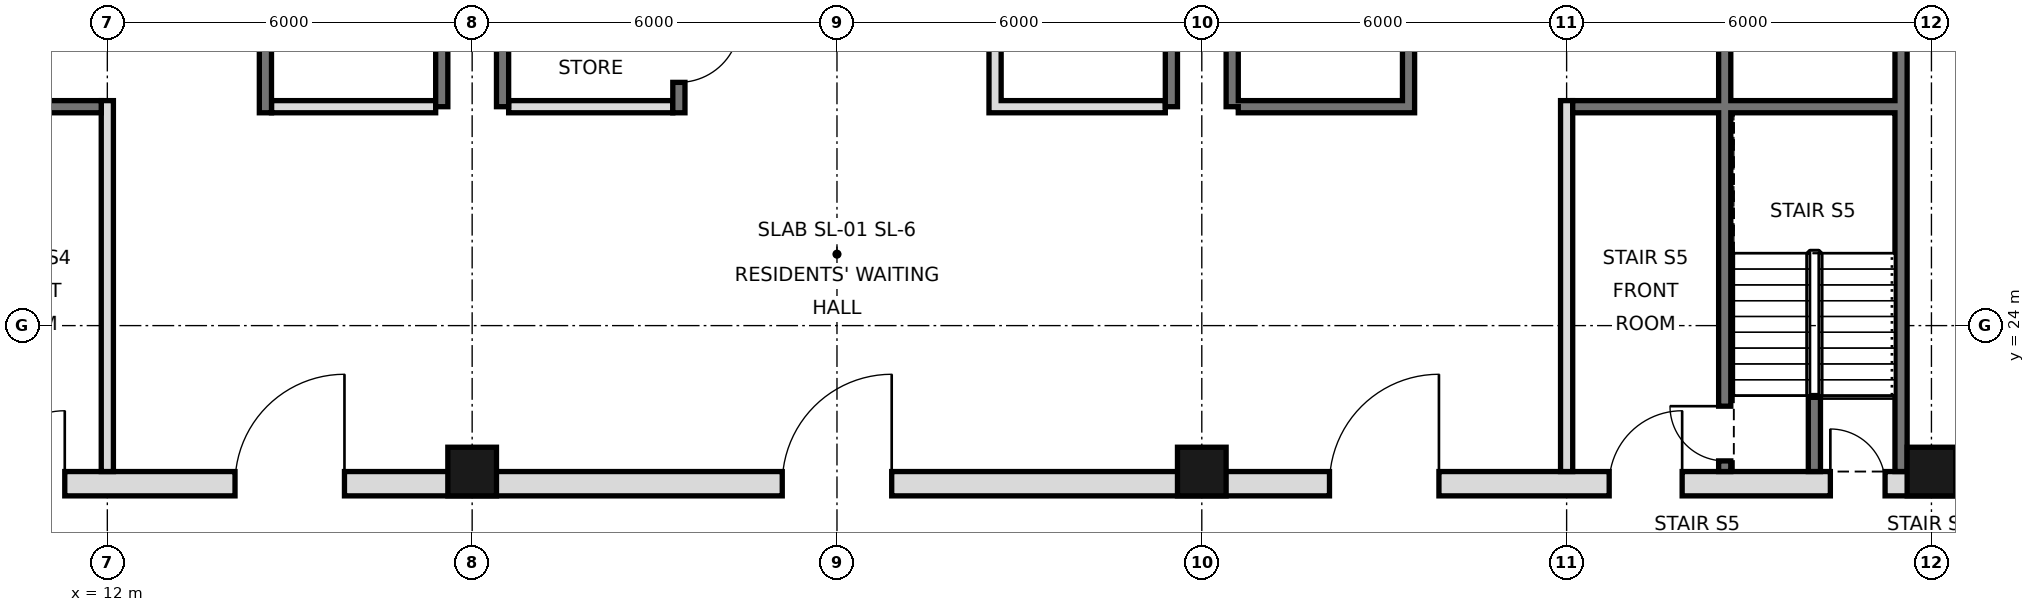
"""IFC4 building model, lengths in metres.
Left out: names, types, materials, properties, quantities, classifications, styles, units other than length and angle.
Written with IfcOpenShell. Run it as: python <this file> out.ifc"""

import sys

from ifc_helpers import new_model, si_unit, direction, frame, frame_2d, origin, origin_2d, place, context, subcontext, project, spatial, rectangle, hollow_rectangle, extrude, element, fill, save


model = new_model("IFC4")
c1 = context("Model", 3, precision=1e-05, world=origin(), true_north=direction((0.0, 1.0)))
c2 = subcontext(c1, "Body", "Model", "MODEL_VIEW")
j1 = project(units=[si_unit("LENGTHUNIT", "METRE"), si_unit("PLANEANGLEUNIT", "RADIAN")], contexts=[c1])
p1 = place(None, origin())
s1 = spatial("IfcSite", under=j1, at=p1, CompositionType="ELEMENT")
p2 = place(p1, origin())
s2 = spatial("IfcBuilding", under=s1, at=p2, CompositionType="ELEMENT")
p3 = place(p2, frame((0.0, 0.0, 331.2)))
s3 = spatial("IfcBuildingStorey", under=s2, at=p3, CompositionType="ELEMENT", Elevation=331.2)
for number, where, z_axis, x_axis in (
    (1, (18.0, 21.6, 0.0), (0.0, 0.0, 1.0), (1.0, 0.0, 0.0)),
    (2, (30.0, 21.6, 0.0), (0.0, 0.0, 1.0), (1.0, 0.0, 0.0)),
    (3, (42.0, 21.6, 0.0), (0.0, 0.0, 1.0), (1.0, 0.0, 0.0)),
):
    element("IfcColumn", number, at=place(p3, frame(where, z_axis=z_axis, x_axis=x_axis)), inside=s3, PredefinedType="COLUMN", context=c2, shape_type="SweptSolid", body=[
        extrude(hollow_rectangle(XDim=0.8, YDim=0.8, WallThickness=0.025, at=origin_2d()), origin(), (0.0, 0.0, 1.0), 6.6),
    ])
p4 = place(p3, frame((41.5, 21.6, 0.0), z_axis=(0.0, 0.0, 1.0), x_axis=(0.0, 1.0, 0.0)))
e4 = element("IfcWall", 4, at=p4, inside=s3, PredefinedType="SOLIDWALL", context=c2, shape_type="SweptSolid", body=[
    extrude(rectangle(XDim=23.5, YDim=0.2, at=frame_2d((11.75, 0.0))), origin(), (0.0, 0.0, 1.0), 6.35),
])
for number, where, z_axis, x_axis in (
    (5, (17.5, 27.6, 0.0), (0.0, 0.0, 1.0), (0.0, 1.0, 0.0)),
    (6, (18.5, 27.6, 0.0), (0.0, 0.0, 1.0), (0.0, 1.0, 0.0)),
    (7, (29.5, 27.6, 0.0), (0.0, 0.0, 1.0), (0.0, 1.0, 0.0)),
    (8, (30.5, 27.6, 0.0), (0.0, 0.0, 1.0), (0.0, 1.0, 0.0)),
):
    element("IfcWall", number, at=place(p3, frame(where, z_axis=z_axis, x_axis=x_axis)), inside=s3, PredefinedType="SOLIDWALL", context=c2, shape_type="SweptSolid", body=[
        extrude(rectangle(XDim=17.5, YDim=0.2, at=frame_2d((8.75, 0.0))), origin(), (0.0, 0.0, 1.0), 6.35),
    ])
p5 = place(p3, frame((5.6, 21.4, 0.0), z_axis=(0.0, 0.0, 1.0), x_axis=(1.0, 0.0, 0.0)))
e9 = element("IfcWall", 9, at=p5, inside=s3, PredefinedType="SOLIDWALL", context=c2, shape_type="SweptSolid", body=[
    extrude(rectangle(XDim=36.8, YDim=0.4, at=frame_2d((18.4, 0.0))), origin(), (0.0, 0.0, 1.0), 6.35),
])
p6 = place(p5, frame((8.5, 0.0, 0.0)))
e10 = element("IfcOpeningElement", 10, at=p6, cuts=e9, PredefinedType="OPENING", context=c2, shape_type="SweptSolid", body=[
    extrude(rectangle(XDim=1.8, YDim=2.1, at=frame_2d((0.9, 1.05))), frame((0.0, 0.21, 0.0), z_axis=(0.0, -1.0, 0.0), x_axis=(1.0, 0.0, 0.0)), (0.0, 0.0, 1.0), 0.42),
])
p7 = place(p5, frame((17.5, 0.0, 0.0)))
e11 = element("IfcOpeningElement", 11, at=p7, cuts=e9, PredefinedType="OPENING", context=c2, shape_type="SweptSolid", body=[
    extrude(rectangle(XDim=1.8, YDim=2.1, at=frame_2d((0.9, 1.05))), frame((0.0, 0.21, 0.0), z_axis=(0.0, -1.0, 0.0), x_axis=(1.0, 0.0, 0.0)), (0.0, 0.0, 1.0), 0.42),
])
p8 = place(p5, frame((26.5, 0.0, 0.0)))
e12 = element("IfcOpeningElement", 12, at=p8, cuts=e9, PredefinedType="OPENING", context=c2, shape_type="SweptSolid", body=[
    extrude(rectangle(XDim=1.8, YDim=2.1, at=frame_2d((0.9, 1.05))), frame((0.0, 0.21, 0.0), z_axis=(0.0, -1.0, 0.0), x_axis=(1.0, 0.0, 0.0)), (0.0, 0.0, 1.0), 0.42),
])
p9 = place(p5, frame((4.5, 0.0, 0.0)))
e13 = element("IfcOpeningElement", 13, at=p9, cuts=e9, PredefinedType="OPENING", context=c2, shape_type="SweptSolid", body=[
    extrude(rectangle(XDim=1.2, YDim=2.1, at=frame_2d((0.6, 1.05))), frame((0.0, 0.21, 0.0), z_axis=(0.0, -1.0, 0.0), x_axis=(1.0, 0.0, 0.0)), (0.0, 0.0, 1.0), 0.42),
])
p10 = place(p5, frame((31.1, 0.0, 0.0)))
e14 = element("IfcOpeningElement", 14, at=p10, cuts=e9, PredefinedType="OPENING", context=c2, shape_type="SweptSolid", body=[
    extrude(rectangle(XDim=1.2, YDim=2.1, at=frame_2d((0.6, 1.05))), frame((0.0, 0.21, 0.0), z_axis=(0.0, -1.0, 0.0), x_axis=(1.0, 0.0, 0.0)), (0.0, 0.0, 1.0), 0.42),
])
p11 = place(p5, frame((1.163, 0.0, 0.0)))
e15 = element("IfcOpeningElement", 15, at=p11, cuts=e9, PredefinedType="OPENING", context=c2, shape_type="SweptSolid", body=[
    extrude(rectangle(XDim=0.9, YDim=2.1, at=frame_2d((0.45, 1.05))), frame((0.0, 0.21, 0.0), z_axis=(0.0, -1.0, 0.0), x_axis=(1.0, 0.0, 0.0)), (0.0, 0.0, 1.0), 0.42),
])
p12 = place(p5, frame((34.738, 0.0, 0.0)))
e16 = element("IfcOpeningElement", 16, at=p12, cuts=e9, PredefinedType="OPENING", context=c2, shape_type="SweptSolid", body=[
    extrude(rectangle(XDim=0.9, YDim=2.1, at=frame_2d((0.45, 1.05))), frame((0.0, 0.21, 0.0), z_axis=(0.0, -1.0, 0.0), x_axis=(1.0, 0.0, 0.0)), (0.0, 0.0, 1.0), 0.42),
])
p13 = place(p3, frame((12.0, 21.6, 0.0), z_axis=(0.0, 0.0, 1.0), x_axis=(0.0, 1.0, 0.0)))
e17 = element("IfcWall", 17, at=p13, inside=s3, PredefinedType="PARTITIONING", context=c2, shape_type="SweptSolid", body=[
    extrude(rectangle(XDim=6.1, YDim=0.2, at=frame_2d((3.05, 0.0))), origin(), (0.0, 0.0, 1.0), 6.35),
])
p14 = place(p3, frame((14.6, 27.5, 0.0), z_axis=(0.0, 0.0, 1.0), x_axis=(0.0, 1.0, 0.0)))
e18 = element("IfcWall", 18, at=p14, inside=s3, PredefinedType="SOLIDWALL", context=c2, shape_type="SweptSolid", body=[
    extrude(rectangle(XDim=17.5, YDim=0.2, at=frame_2d((8.75, 0.0))), origin(), (0.0, 0.0, 1.0), 6.35),
])
p15 = place(p14, frame((15.4, 0.0, 0.0)))
e19 = element("IfcOpeningElement", 19, at=p15, cuts=e18, PredefinedType="OPENING", context=c2, shape_type="SweptSolid", body=[
    extrude(rectangle(XDim=1.1, YDim=2.1, at=frame_2d((0.55, 1.05))), frame((0.0, 0.11, 0.0), z_axis=(0.0, -1.0, 0.0), x_axis=(1.0, 0.0, 0.0)), (0.0, 0.0, 1.0), 0.22),
])
p16 = place(p14, frame((2.7, 0.0, 0.0)))
e20 = element("IfcOpeningElement", 20, at=p16, cuts=e18, PredefinedType="OPENING", context=c2, shape_type="SweptSolid", body=[
    extrude(rectangle(XDim=1.0, YDim=2.1, at=frame_2d((0.5, 1.05))), frame((0.0, 0.11, 0.0), z_axis=(0.0, -1.0, 0.0), x_axis=(1.0, 0.0, 0.0)), (0.0, 0.0, 1.0), 0.22),
])
p17 = place(p14, frame((9.9, 0.0, 0.0)))
e21 = element("IfcOpeningElement", 21, at=p17, cuts=e18, PredefinedType="OPENING", context=c2, shape_type="SweptSolid", body=[
    extrude(rectangle(XDim=0.9, YDim=2.1, at=frame_2d((0.45, 1.05))), frame((0.0, 0.11, 0.0), z_axis=(0.0, -1.0, 0.0), x_axis=(1.0, 0.0, 0.0)), (0.0, 0.0, 1.0), 0.22),
])
p18 = place(p3, frame((21.4, 27.5, 0.0), z_axis=(0.0, 0.0, 1.0), x_axis=(0.0, 1.0, 0.0)))
e22 = element("IfcWall", 22, at=p18, inside=s3, PredefinedType="SOLIDWALL", context=c2, shape_type="SweptSolid", body=[
    extrude(rectangle(XDim=17.5, YDim=0.2, at=frame_2d((8.75, 0.0))), origin(), (0.0, 0.0, 1.0), 6.35),
])
p19 = place(p18, frame((0.5, 0.0, 0.0)))
e23 = element("IfcOpeningElement", 23, at=p19, cuts=e22, PredefinedType="OPENING", context=c2, shape_type="SweptSolid", body=[
    extrude(rectangle(XDim=1.0, YDim=2.1, at=frame_2d((0.5, 1.05))), frame((0.0, 0.11, 0.0), z_axis=(0.0, -1.0, 0.0), x_axis=(1.0, 0.0, 0.0)), (0.0, 0.0, 1.0), 0.22),
])
p20 = place(p18, frame((3.6, 0.0, 0.0)))
e24 = element("IfcOpeningElement", 24, at=p20, cuts=e22, PredefinedType="OPENING", context=c2, shape_type="SweptSolid", body=[
    extrude(rectangle(XDim=1.0, YDim=2.1, at=frame_2d((0.5, 1.05))), frame((0.0, 0.11, 0.0), z_axis=(0.0, -1.0, 0.0), x_axis=(1.0, 0.0, 0.0)), (0.0, 0.0, 1.0), 0.22),
])
p21 = place(p18, frame((16.2, 0.0, 0.0)))
e25 = element("IfcOpeningElement", 25, at=p21, cuts=e22, PredefinedType="OPENING", context=c2, shape_type="SweptSolid", body=[
    extrude(rectangle(XDim=1.0, YDim=2.1, at=frame_2d((0.5, 1.05))), frame((0.0, 0.11, 0.0), z_axis=(0.0, -1.0, 0.0), x_axis=(1.0, 0.0, 0.0)), (0.0, 0.0, 1.0), 0.22),
])
p22 = place(p18, frame((9.8, 0.0, 0.0)))
e26 = element("IfcOpeningElement", 26, at=p22, cuts=e22, PredefinedType="OPENING", context=c2, shape_type="SweptSolid", body=[
    extrude(rectangle(XDim=1.0, YDim=2.1, at=frame_2d((0.5, 1.05))), frame((0.0, 0.11, 0.0), z_axis=(0.0, -1.0, 0.0), x_axis=(1.0, 0.0, 0.0)), (0.0, 0.0, 1.0), 0.22),
])
p23 = place(p18, frame((7.4, 0.0, 0.0)))
e27 = element("IfcOpeningElement", 27, at=p23, cuts=e22, PredefinedType="OPENING", context=c2, shape_type="SweptSolid", body=[
    extrude(rectangle(XDim=0.9, YDim=2.1, at=frame_2d((0.45, 1.05))), frame((0.0, 0.11, 0.0), z_axis=(0.0, -1.0, 0.0), x_axis=(1.0, 0.0, 0.0)), (0.0, 0.0, 1.0), 0.22),
])
p24 = place(p3, frame((26.6, 27.5, 0.0), z_axis=(0.0, 0.0, 1.0), x_axis=(0.0, 1.0, 0.0)))
e28 = element("IfcWall", 28, at=p24, inside=s3, PredefinedType="SOLIDWALL", context=c2, shape_type="SweptSolid", body=[
    extrude(rectangle(XDim=17.5, YDim=0.2, at=frame_2d((8.75, 0.0))), origin(), (0.0, 0.0, 1.0), 6.35),
])
p25 = place(p24, frame((4.3, 0.0, 0.0)))
e29 = element("IfcOpeningElement", 29, at=p25, cuts=e28, PredefinedType="OPENING", context=c2, shape_type="SweptSolid", body=[
    extrude(rectangle(XDim=0.9, YDim=2.1, at=frame_2d((0.45, 1.05))), frame((0.0, 0.11, 0.0), z_axis=(0.0, -1.0, 0.0), x_axis=(1.0, 0.0, 0.0)), (0.0, 0.0, 1.0), 0.22),
])
p26 = place(p24, frame((10.35, 0.0, 0.0)))
e30 = element("IfcOpeningElement", 30, at=p26, cuts=e28, PredefinedType="OPENING", context=c2, shape_type="SweptSolid", body=[
    extrude(rectangle(XDim=1.0, YDim=2.1, at=frame_2d((0.5, 1.05))), frame((0.0, 0.11, 0.0), z_axis=(0.0, -1.0, 0.0), x_axis=(1.0, 0.0, 0.0)), (0.0, 0.0, 1.0), 0.22),
])
p27 = place(p24, frame((14.575, 0.0, 0.0)))
e31 = element("IfcOpeningElement", 31, at=p27, cuts=e28, PredefinedType="OPENING", context=c2, shape_type="SweptSolid", body=[
    extrude(rectangle(XDim=1.0, YDim=2.1, at=frame_2d((0.5, 1.05))), frame((0.0, 0.11, 0.0), z_axis=(0.0, -1.0, 0.0), x_axis=(1.0, 0.0, 0.0)), (0.0, 0.0, 1.0), 0.22),
])
p28 = place(p3, frame((33.4, 27.5, 0.0), z_axis=(0.0, 0.0, 1.0), x_axis=(0.0, 1.0, 0.0)))
e32 = element("IfcWall", 32, at=p28, inside=s3, PredefinedType="SOLIDWALL", context=c2, shape_type="SweptSolid", body=[
    extrude(rectangle(XDim=17.5, YDim=0.2, at=frame_2d((8.75, 0.0))), origin(), (0.0, 0.0, 1.0), 6.35),
])
p29 = place(p28, frame((15.4, 0.0, 0.0)))
e33 = element("IfcOpeningElement", 33, at=p29, cuts=e32, PredefinedType="OPENING", context=c2, shape_type="SweptSolid", body=[
    extrude(rectangle(XDim=1.1, YDim=2.1, at=frame_2d((0.55, 1.05))), frame((0.0, 0.11, 0.0), z_axis=(0.0, -1.0, 0.0), x_axis=(1.0, 0.0, 0.0)), (0.0, 0.0, 1.0), 0.22),
])
p30 = place(p28, frame((9.9, 0.0, 0.0)))
e34 = element("IfcOpeningElement", 34, at=p30, cuts=e32, PredefinedType="OPENING", context=c2, shape_type="SweptSolid", body=[
    extrude(rectangle(XDim=0.9, YDim=2.1, at=frame_2d((0.45, 1.05))), frame((0.0, 0.11, 0.0), z_axis=(0.0, -1.0, 0.0), x_axis=(1.0, 0.0, 0.0)), (0.0, 0.0, 1.0), 0.22),
])
p31 = place(p3, frame((36.0, 21.6, 0.0), z_axis=(0.0, 0.0, 1.0), x_axis=(0.0, 1.0, 0.0)))
e35 = element("IfcWall", 35, at=p31, inside=s3, PredefinedType="PARTITIONING", context=c2, shape_type="SweptSolid", body=[
    extrude(rectangle(XDim=6.1, YDim=0.2, at=frame_2d((3.05, 0.0))), origin(), (0.0, 0.0, 1.0), 6.35),
])
p32 = place(p3, frame((38.6, 21.6, 0.0), z_axis=(0.0, 0.0, 1.0), x_axis=(0.0, 1.0, 0.0)))
e36 = element("IfcWall", 36, at=p32, inside=s3, PredefinedType="SOLIDWALL", context=c2, shape_type="SweptSolid", body=[
    extrude(rectangle(XDim=23.4, YDim=0.2, at=frame_2d((11.7, 0.0))), origin(), (0.0, 0.0, 1.0), 6.35),
])
p33 = place(p32, frame((22.1, 0.0, 0.0)))
e37 = element("IfcOpeningElement", 37, at=p33, cuts=e36, PredefinedType="OPENING", context=c2, shape_type="SweptSolid", body=[
    extrude(rectangle(XDim=1.0, YDim=2.1, at=frame_2d((0.5, 1.05))), frame((0.0, 0.11, 0.0), z_axis=(0.0, -1.0, 0.0), x_axis=(1.0, 0.0, 0.0)), (0.0, 0.0, 1.0), 0.22),
])
p34 = place(p32, frame((15.7, 0.0, 0.0)))
e38 = element("IfcOpeningElement", 38, at=p34, cuts=e36, PredefinedType="OPENING", context=c2, shape_type="SweptSolid", body=[
    extrude(rectangle(XDim=1.0, YDim=2.1, at=frame_2d((0.5, 1.05))), frame((0.0, 0.11, 0.0), z_axis=(0.0, -1.0, 0.0), x_axis=(1.0, 0.0, 0.0)), (0.0, 0.0, 1.0), 0.22),
])
p35 = place(p32, frame((0.175, 0.0, 0.0)))
e39 = element("IfcOpeningElement", 39, at=p35, cuts=e36, PredefinedType="OPENING", context=c2, shape_type="SweptSolid", body=[
    extrude(rectangle(XDim=0.9, YDim=2.1, at=frame_2d((0.45, 1.05))), frame((0.0, 0.11, 0.0), z_axis=(0.0, -1.0, 0.0), x_axis=(1.0, 0.0, 0.0)), (0.0, 0.0, 1.0), 0.22),
])
p36 = place(p3, frame((40.075, 21.6, 0.0), z_axis=(0.0, 0.0, 1.0), x_axis=(0.0, 1.0, 0.0)))
e40 = element("IfcWall", 40, at=p36, inside=s3, PredefinedType="SOLIDWALL", context=c2, shape_type="SweptSolid", body=[
    extrude(rectangle(XDim=1.25, YDim=0.2, at=frame_2d((0.625, 0.0))), origin(), (0.0, 0.0, 1.0), 6.35),
])
for number, where, z_axis, x_axis in (
    (41, (14.7, 27.6, 0.0), (0.0, 0.0, 1.0), (1.0, 0.0, 0.0)),
    (42, (18.6, 27.6, 0.0), (0.0, 0.0, 1.0), (1.0, 0.0, 0.0)),
):
    element("IfcWall", number, at=place(p3, frame(where, z_axis=z_axis, x_axis=x_axis)), inside=s3, PredefinedType="PARTITIONING", context=c2, shape_type="SweptSolid", body=[
        extrude(rectangle(XDim=2.7, YDim=0.2, at=frame_2d((1.35, 0.0))), origin(), (0.0, 0.0, 1.0), 6.35),
    ])
for number, where, z_axis, x_axis in (
    (43, (26.7, 27.6, 0.0), (0.0, 0.0, 1.0), (1.0, 0.0, 0.0)),
    (44, (30.6, 27.6, 0.0), (0.0, 0.0, 1.0), (1.0, 0.0, 0.0)),
):
    element("IfcWall", number, at=place(p3, frame(where, z_axis=z_axis, x_axis=x_axis)), inside=s3, PredefinedType="SOLIDWALL", context=c2, shape_type="SweptSolid", body=[
        extrude(rectangle(XDim=2.7, YDim=0.2, at=frame_2d((1.35, 0.0))), origin(), (0.0, 0.0, 1.0), 6.35),
    ])
for number, where, z_axis, x_axis in (
    (45, (36.1, 27.6, 0.0), (0.0, 0.0, 1.0), (1.0, 0.0, 0.0)),
    (46, (6.6, 27.6, 0.0), (0.0, 0.0, 1.0), (1.0, 0.0, 0.0)),
):
    element("IfcWall", number, at=place(p3, frame(where, z_axis=z_axis, x_axis=x_axis)), inside=s3, PredefinedType="SOLIDWALL", context=c2, shape_type="SweptSolid", body=[
        extrude(rectangle(XDim=5.3, YDim=0.2, at=frame_2d((2.65, 0.0))), origin(), (0.0, 0.0, 1.0), 6.35),
    ])
p37 = place(p6, frame((1.8, 0.0, 0.0), z_axis=(0.0, 0.0, 1.0), x_axis=(-1.0, 0.0, 0.0)))
e47 = element("IfcDoor", 47, at=p37, inside=s3, OperationType="SINGLE_SWING_LEFT", PredefinedType="DOOR", context=c2, shape_type="SweptSolid", body=[
    extrude(rectangle(XDim=1.8, YDim=2.1, at=frame_2d((0.9, 1.05))), frame((0.0, 0.025, 0.0), z_axis=(0.0, -1.0, 0.0), x_axis=(1.0, 0.0, 0.0)), (0.0, 0.0, 1.0), 0.05),
])
fill(e10, e47)
p38 = place(p7, frame((1.8, 0.0, 0.0), z_axis=(0.0, 0.0, 1.0), x_axis=(-1.0, 0.0, 0.0)))
e48 = element("IfcDoor", 48, at=p38, inside=s3, OperationType="SINGLE_SWING_LEFT", PredefinedType="DOOR", context=c2, shape_type="SweptSolid", body=[
    extrude(rectangle(XDim=1.8, YDim=2.1, at=frame_2d((0.9, 1.05))), frame((0.0, 0.025, 0.0), z_axis=(0.0, -1.0, 0.0), x_axis=(1.0, 0.0, 0.0)), (0.0, 0.0, 1.0), 0.05),
])
fill(e11, e48)
p39 = place(p8, frame((1.8, 0.0, 0.0), z_axis=(0.0, 0.0, 1.0), x_axis=(-1.0, 0.0, 0.0)))
e49 = element("IfcDoor", 49, at=p39, inside=s3, OperationType="SINGLE_SWING_LEFT", PredefinedType="DOOR", context=c2, shape_type="SweptSolid", body=[
    extrude(rectangle(XDim=1.8, YDim=2.1, at=frame_2d((0.9, 1.05))), frame((0.0, 0.025, 0.0), z_axis=(0.0, -1.0, 0.0), x_axis=(1.0, 0.0, 0.0)), (0.0, 0.0, 1.0), 0.05),
])
fill(e12, e49)
p40 = place(p9, frame((1.2, 0.0, 0.0), z_axis=(0.0, 0.0, 1.0), x_axis=(-1.0, 0.0, 0.0)))
e50 = element("IfcDoor", 50, at=p40, inside=s3, OperationType="SINGLE_SWING_LEFT", PredefinedType="DOOR", context=c2, shape_type="SweptSolid", body=[
    extrude(rectangle(XDim=1.2, YDim=2.1, at=frame_2d((0.6, 1.05))), frame((0.0, 0.025, 0.0), z_axis=(0.0, -1.0, 0.0), x_axis=(1.0, 0.0, 0.0)), (0.0, 0.0, 1.0), 0.05),
])
fill(e13, e50)
p41 = place(p10, frame((1.2, 0.0, 0.0), z_axis=(0.0, 0.0, 1.0), x_axis=(-1.0, 0.0, 0.0)))
e51 = element("IfcDoor", 51, at=p41, inside=s3, OperationType="SINGLE_SWING_LEFT", PredefinedType="DOOR", context=c2, shape_type="SweptSolid", body=[
    extrude(rectangle(XDim=1.2, YDim=2.1, at=frame_2d((0.6, 1.05))), frame((0.0, 0.025, 0.0), z_axis=(0.0, -1.0, 0.0), x_axis=(1.0, 0.0, 0.0)), (0.0, 0.0, 1.0), 0.05),
])
fill(e14, e51)
p42 = place(p19, origin())
e52 = element("IfcDoor", 52, at=p42, inside=s3, OperationType="SINGLE_SWING_RIGHT", PredefinedType="DOOR", context=c2, shape_type="SweptSolid", body=[
    extrude(rectangle(XDim=1.0, YDim=2.1, at=frame_2d((0.5, 1.05))), frame((0.0, 0.025, 0.0), z_axis=(0.0, -1.0, 0.0), x_axis=(1.0, 0.0, 0.0)), (0.0, 0.0, 1.0), 0.05),
])
fill(e23, e52)
p43 = place(p35, frame((0.9, 0.0, 0.0), z_axis=(0.0, 0.0, 1.0), x_axis=(-1.0, 0.0, 0.0)))
e53 = element("IfcDoor", 53, at=p43, inside=s3, OperationType="SINGLE_SWING_LEFT", PredefinedType="DOOR", context=c2, shape_type="SweptSolid", body=[
    extrude(rectangle(XDim=0.9, YDim=2.1, at=frame_2d((0.45, 1.05))), frame((0.0, 0.025, 0.0), z_axis=(0.0, -1.0, 0.0), x_axis=(1.0, 0.0, 0.0)), (0.0, 0.0, 1.0), 0.05),
])
fill(e39, e53)
p44 = place(p12, origin())
e54 = element("IfcDoor", 54, at=p44, inside=s3, OperationType="SINGLE_SWING_LEFT", PredefinedType="DOOR", context=c2, shape_type="SweptSolid", body=[
    extrude(rectangle(XDim=0.9, YDim=2.1, at=frame_2d((0.45, 1.05))), frame((0.0, 0.025, 0.0), z_axis=(0.0, -1.0, 0.0), x_axis=(1.0, 0.0, 0.0)), (0.0, 0.0, 1.0), 0.05),
])
fill(e16, e54)
save(model, sys.argv[1])
